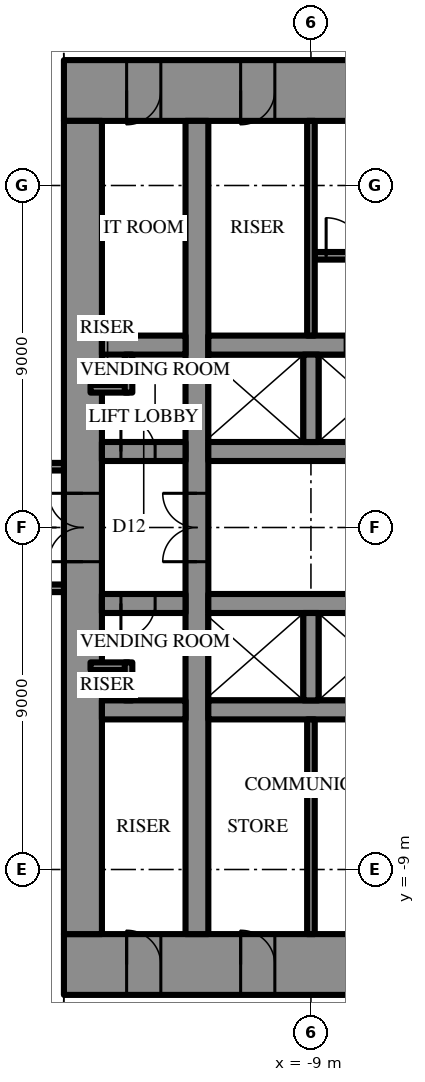
"""IFC4 building model, lengths in metres.
Left out: names, types, materials, properties, quantities, classifications, styles, units other than length and angle.
Written with IfcOpenShell. Run it as: python <this file> out.ifc"""

import sys

from ifc_helpers import new_model, si_unit, direction, frame, frame_2d, origin, place, context, subcontext, project, spatial, rectangle, extrude, element, fill, save


model = new_model("IFC4")
c1 = context("Model", 3, precision=1e-05, world=origin(), true_north=direction((0.0, 1.0)))
c2 = subcontext(c1, "Body", "Model", "MODEL_VIEW")
j1 = project(units=[si_unit("LENGTHUNIT", "METRE"), si_unit("PLANEANGLEUNIT", "RADIAN")], contexts=[c1])
p1 = place(None, origin())
s1 = spatial("IfcSite", under=j1, at=p1, CompositionType="ELEMENT")
p2 = place(p1, origin())
s2 = spatial("IfcBuilding", under=s1, at=p2, CompositionType="ELEMENT")
p3 = place(p2, frame((0.0, 0.0, 223.9)))
s3 = spatial("IfcBuildingStorey", under=s2, at=p3, CompositionType="ELEMENT", Elevation=223.9)
p4 = place(p3, frame((-15.5, 11.5, 0.0), z_axis=(0.0, 0.0, 1.0), x_axis=(1.0, 0.0, 0.0)))
e1 = element("IfcWall", 1, at=p4, inside=s3, PredefinedType="SHEAR", context=c2, shape_type="SweptSolid", body=[
    extrude(rectangle(XDim=31.0, YDim=1.6, at=frame_2d((15.5, 0.0))), origin(), (0.0, 0.0, 1.0), 4.2),
])
p5 = place(p4, frame((16.35, 0.0, 0.0)))
e2 = element("IfcOpeningElement", 2, at=p5, cuts=e1, PredefinedType="OPENING", context=c2, shape_type="SweptSolid", body=[
    extrude(rectangle(XDim=0.9, YDim=2.2, at=frame_2d((0.45, 1.1))), frame((0.0, 0.81, 0.0), z_axis=(0.0, -1.0, 0.0), x_axis=(1.0, 0.0, 0.0)), (0.0, 0.0, 1.0), 1.62),
])
p6 = place(p4, frame((19.35, 0.0, 0.0)))
e3 = element("IfcOpeningElement", 3, at=p6, cuts=e1, PredefinedType="OPENING", context=c2, shape_type="SweptSolid", body=[
    extrude(rectangle(XDim=0.9, YDim=2.2, at=frame_2d((0.45, 1.1))), frame((0.0, 0.81, 0.0), z_axis=(0.0, -1.0, 0.0), x_axis=(1.0, 0.0, 0.0)), (0.0, 0.0, 1.0), 1.62),
])
p7 = place(p4, frame((22.4, 0.0, 0.0)))
e4 = element("IfcOpeningElement", 4, at=p7, cuts=e1, PredefinedType="OPENING", context=c2, shape_type="SweptSolid", body=[
    extrude(rectangle(XDim=1.0, YDim=2.2, at=frame_2d((0.5, 1.1))), frame((0.0, 0.81, 0.0), z_axis=(0.0, -1.0, 0.0), x_axis=(1.0, 0.0, 0.0)), (0.0, 0.0, 1.0), 1.62),
])
p8 = place(p4, frame((1.65, 0.0, 0.0)))
e5 = element("IfcOpeningElement", 5, at=p8, cuts=e1, PredefinedType="OPENING", context=c2, shape_type="SweptSolid", body=[
    extrude(rectangle(XDim=0.9, YDim=2.2, at=frame_2d((0.45, 1.1))), frame((0.0, 0.81, 0.0), z_axis=(0.0, -1.0, 0.0), x_axis=(1.0, 0.0, 0.0)), (0.0, 0.0, 1.0), 1.62),
])
p9 = place(p4, frame((4.65, 0.0, 0.0)))
e6 = element("IfcOpeningElement", 6, at=p9, cuts=e1, PredefinedType="OPENING", context=c2, shape_type="SweptSolid", body=[
    extrude(rectangle(XDim=0.9, YDim=2.2, at=frame_2d((0.45, 1.1))), frame((0.0, 0.81, 0.0), z_axis=(0.0, -1.0, 0.0), x_axis=(1.0, 0.0, 0.0)), (0.0, 0.0, 1.0), 1.62),
])
p10 = place(p4, frame((25.45, 0.0, 0.0)))
e7 = element("IfcOpeningElement", 7, at=p10, cuts=e1, PredefinedType="OPENING", context=c2, shape_type="SweptSolid", body=[
    extrude(rectangle(XDim=0.9, YDim=2.2, at=frame_2d((0.45, 1.1))), frame((0.0, 0.81, 0.0), z_axis=(0.0, -1.0, 0.0), x_axis=(1.0, 0.0, 0.0)), (0.0, 0.0, 1.0), 1.62),
])
p11 = place(p4, frame((28.45, 0.0, 0.0)))
e8 = element("IfcOpeningElement", 8, at=p11, cuts=e1, PredefinedType="OPENING", context=c2, shape_type="SweptSolid", body=[
    extrude(rectangle(XDim=0.9, YDim=2.2, at=frame_2d((0.45, 1.1))), frame((0.0, 0.81, 0.0), z_axis=(0.0, -1.0, 0.0), x_axis=(1.0, 0.0, 0.0)), (0.0, 0.0, 1.0), 1.62),
])
p12 = place(p3, frame((15.5, -11.5, 0.0), z_axis=(0.0, 0.0, 1.0), x_axis=(-1.0, 0.0, 0.0)))
e9 = element("IfcWall", 9, at=p12, inside=s3, PredefinedType="SHEAR", context=c2, shape_type="SweptSolid", body=[
    extrude(rectangle(XDim=31.0, YDim=1.6, at=frame_2d((15.5, 0.0))), origin(), (0.0, 0.0, 1.0), 4.2),
])
p13 = place(p12, frame((16.35, 0.0, 0.0)))
e10 = element("IfcOpeningElement", 10, at=p13, cuts=e9, PredefinedType="OPENING", context=c2, shape_type="SweptSolid", body=[
    extrude(rectangle(XDim=0.9, YDim=2.2, at=frame_2d((0.45, 1.1))), frame((0.0, 0.81, 0.0), z_axis=(0.0, -1.0, 0.0), x_axis=(1.0, 0.0, 0.0)), (0.0, 0.0, 1.0), 1.62),
])
p14 = place(p12, frame((19.35, 0.0, 0.0)))
e11 = element("IfcOpeningElement", 11, at=p14, cuts=e9, PredefinedType="OPENING", context=c2, shape_type="SweptSolid", body=[
    extrude(rectangle(XDim=0.9, YDim=2.2, at=frame_2d((0.45, 1.1))), frame((0.0, 0.81, 0.0), z_axis=(0.0, -1.0, 0.0), x_axis=(1.0, 0.0, 0.0)), (0.0, 0.0, 1.0), 1.62),
])
p15 = place(p12, frame((22.4, 0.0, 0.0)))
e12 = element("IfcOpeningElement", 12, at=p15, cuts=e9, PredefinedType="OPENING", context=c2, shape_type="SweptSolid", body=[
    extrude(rectangle(XDim=1.0, YDim=2.2, at=frame_2d((0.5, 1.1))), frame((0.0, 0.81, 0.0), z_axis=(0.0, -1.0, 0.0), x_axis=(1.0, 0.0, 0.0)), (0.0, 0.0, 1.0), 1.62),
])
p16 = place(p12, frame((1.65, 0.0, 0.0)))
e13 = element("IfcOpeningElement", 13, at=p16, cuts=e9, PredefinedType="OPENING", context=c2, shape_type="SweptSolid", body=[
    extrude(rectangle(XDim=0.9, YDim=2.2, at=frame_2d((0.45, 1.1))), frame((0.0, 0.81, 0.0), z_axis=(0.0, -1.0, 0.0), x_axis=(1.0, 0.0, 0.0)), (0.0, 0.0, 1.0), 1.62),
])
p17 = place(p12, frame((4.65, 0.0, 0.0)))
e14 = element("IfcOpeningElement", 14, at=p17, cuts=e9, PredefinedType="OPENING", context=c2, shape_type="SweptSolid", body=[
    extrude(rectangle(XDim=0.9, YDim=2.2, at=frame_2d((0.45, 1.1))), frame((0.0, 0.81, 0.0), z_axis=(0.0, -1.0, 0.0), x_axis=(1.0, 0.0, 0.0)), (0.0, 0.0, 1.0), 1.62),
])
p18 = place(p12, frame((25.45, 0.0, 0.0)))
e15 = element("IfcOpeningElement", 15, at=p18, cuts=e9, PredefinedType="OPENING", context=c2, shape_type="SweptSolid", body=[
    extrude(rectangle(XDim=0.9, YDim=2.2, at=frame_2d((0.45, 1.1))), frame((0.0, 0.81, 0.0), z_axis=(0.0, -1.0, 0.0), x_axis=(1.0, 0.0, 0.0)), (0.0, 0.0, 1.0), 1.62),
])
p19 = place(p12, frame((28.45, 0.0, 0.0)))
e16 = element("IfcOpeningElement", 16, at=p19, cuts=e9, PredefinedType="OPENING", context=c2, shape_type="SweptSolid", body=[
    extrude(rectangle(XDim=0.9, YDim=2.2, at=frame_2d((0.45, 1.1))), frame((0.0, 0.81, 0.0), z_axis=(0.0, -1.0, 0.0), x_axis=(1.0, 0.0, 0.0)), (0.0, 0.0, 1.0), 1.62),
])
p20 = place(p3, frame((-15.0, 10.7, 0.0), z_axis=(0.0, 0.0, 1.0), x_axis=(0.0, -1.0, 0.0)))
e17 = element("IfcWall", 17, at=p20, inside=s3, PredefinedType="SHEAR", context=c2, shape_type="SweptSolid", body=[
    extrude(rectangle(XDim=21.4, YDim=1.0, at=frame_2d((10.7, 0.0))), origin(), (0.0, 0.0, 1.0), 4.2),
])
p21 = place(p20, frame((9.8, 0.0, 0.0)))
e18 = element("IfcOpeningElement", 18, at=p21, cuts=e17, PredefinedType="OPENING", context=c2, shape_type="SweptSolid", body=[
    extrude(rectangle(XDim=1.8, YDim=2.4, at=frame_2d((0.9, 1.2))), frame((0.0, 0.51, 0.0), z_axis=(0.0, -1.0, 0.0), x_axis=(1.0, 0.0, 0.0)), (0.0, 0.0, 1.0), 1.02),
])
p22 = place(p3, frame((-12.0, -10.7, 0.0), z_axis=(0.0, 0.0, 1.0), x_axis=(0.0, 1.0, 0.0)))
e19 = element("IfcWall", 19, at=p22, inside=s3, PredefinedType="SHEAR", context=c2, shape_type="SweptSolid", body=[
    extrude(rectangle(XDim=21.4, YDim=0.6, at=frame_2d((10.7, 0.0))), origin(), (0.0, 0.0, 1.0), 4.2),
])
p23 = place(p22, frame((9.8, 0.0, 0.0)))
e20 = element("IfcOpeningElement", 20, at=p23, cuts=e19, PredefinedType="OPENING", context=c2, shape_type="SweptSolid", body=[
    extrude(rectangle(XDim=1.8, YDim=2.4, at=frame_2d((0.9, 1.2))), frame((0.0, 0.31, 0.0), z_axis=(0.0, -1.0, 0.0), x_axis=(1.0, 0.0, 0.0)), (0.0, 0.0, 1.0), 0.62),
])
p24 = place(p3, frame((-14.5, 2.0, 0.0), z_axis=(0.0, 0.0, 1.0), x_axis=(1.0, 0.0, 0.0)))
e21 = element("IfcWall", 21, at=p24, inside=s3, PredefinedType="SHEAR", context=c2, shape_type="SweptSolid", body=[
    extrude(rectangle(XDim=2.2, YDim=0.5, at=frame_2d((1.1, 0.0))), origin(), (0.0, 0.0, 1.0), 4.2),
])
p25 = place(p24, frame((0.5, 0.0, 0.0)))
e22 = element("IfcOpeningElement", 22, at=p25, cuts=e21, PredefinedType="OPENING", context=c2, shape_type="SweptSolid", body=[
    extrude(rectangle(XDim=0.9, YDim=2.2, at=frame_2d((0.45, 1.1))), frame((0.0, 0.26, 0.0), z_axis=(0.0, -1.0, 0.0), x_axis=(1.0, 0.0, 0.0)), (0.0, 0.0, 1.0), 0.52),
])
p26 = place(p3, frame((-11.7, 2.0, 0.0), z_axis=(0.0, 0.0, 1.0), x_axis=(1.0, 0.0, 0.0)))
e23 = element("IfcWall", 23, at=p26, inside=s3, PredefinedType="SHEAR", context=c2, shape_type="SweptSolid", body=[
    extrude(rectangle(XDim=5.9, YDim=0.5, at=frame_2d((2.95, 0.0))), origin(), (0.0, 0.0, 1.0), 4.2),
])
p27 = place(p3, frame((-14.5, 4.8, 0.0), z_axis=(0.0, 0.0, 1.0), x_axis=(1.0, 0.0, 0.0)))
e24 = element("IfcWall", 24, at=p27, inside=s3, PredefinedType="SHEAR", context=c2, shape_type="SweptSolid", body=[
    extrude(rectangle(XDim=2.2, YDim=0.5, at=frame_2d((1.1, 0.0))), origin(), (0.0, 0.0, 1.0), 4.2),
])
p28 = place(p3, frame((-11.7, 4.8, 0.0), z_axis=(0.0, 0.0, 1.0), x_axis=(1.0, 0.0, 0.0)))
e25 = element("IfcWall", 25, at=p28, inside=s3, PredefinedType="SHEAR", context=c2, shape_type="SweptSolid", body=[
    extrude(rectangle(XDim=23.4, YDim=0.5, at=frame_2d((11.7, 0.0))), origin(), (0.0, 0.0, 1.0), 4.2),
])
p29 = place(p28, frame((6.6, 0.0, 0.0)))
e26 = element("IfcOpeningElement", 26, at=p29, cuts=e25, PredefinedType="OPENING", context=c2, shape_type="SweptSolid", body=[
    extrude(rectangle(XDim=1.2, YDim=2.2, at=frame_2d((0.6, 1.1))), frame((0.0, 0.26, 0.0), z_axis=(0.0, -1.0, 0.0), x_axis=(1.0, 0.0, 0.0)), (0.0, 0.0, 1.0), 0.52),
])
p30 = place(p28, frame((3.6, 0.0, 0.0)))
e27 = element("IfcOpeningElement", 27, at=p30, cuts=e25, PredefinedType="OPENING", context=c2, shape_type="SweptSolid", body=[
    extrude(rectangle(XDim=1.2, YDim=2.2, at=frame_2d((0.6, 1.1))), frame((0.0, 0.26, 0.0), z_axis=(0.0, -1.0, 0.0), x_axis=(1.0, 0.0, 0.0)), (0.0, 0.0, 1.0), 0.52),
])
p31 = place(p3, frame((-9.0, 2.25, 0.0), z_axis=(0.0, 0.0, 1.0), x_axis=(0.0, 1.0, 0.0)))
e28 = element("IfcWall", 28, at=p31, inside=s3, PredefinedType="SHEAR", context=c2, shape_type="SweptSolid", body=[
    extrude(rectangle(XDim=2.3, YDim=0.4, at=frame_2d((1.15, 0.0))), origin(), (0.0, 0.0, 1.0), 4.2),
])
p32 = place(p3, frame((-8.9, 7.15, 0.0), z_axis=(0.0, 0.0, 1.0), x_axis=(1.0, 0.0, 0.0)))
e29 = element("IfcWall", 29, at=p32, inside=s3, PredefinedType="SHEAR", context=c2, shape_type="SweptSolid", body=[
    extrude(rectangle(XDim=8.6, YDim=0.2, at=frame_2d((4.3, 0.0))), origin(), (0.0, 0.0, 1.0), 4.2),
])
p33 = place(p32, frame((0.3, 0.0, 0.0)))
e30 = element("IfcOpeningElement", 30, at=p33, cuts=e29, PredefinedType="OPENING", context=c2, shape_type="SweptSolid", body=[
    extrude(rectangle(XDim=1.0, YDim=2.2, at=frame_2d((0.5, 1.1))), frame((0.0, 0.11, 0.0), z_axis=(0.0, -1.0, 0.0), x_axis=(1.0, 0.0, 0.0)), (0.0, 0.0, 1.0), 0.22),
])
p34 = place(p3, frame((3.2, -2.0, 0.0), z_axis=(0.0, 0.0, 1.0), x_axis=(-1.0, 0.0, 0.0)))
e31 = element("IfcWall", 31, at=p34, inside=s3, PredefinedType="SHEAR", context=c2, shape_type="SweptSolid", body=[
    extrude(rectangle(XDim=14.9, YDim=0.5, at=frame_2d((7.45, 0.0))), origin(), (0.0, 0.0, 1.0), 4.2),
])
p35 = place(p34, frame((1.15, 0.0, 0.0)))
e32 = element("IfcOpeningElement", 32, at=p35, cuts=e31, PredefinedType="OPENING", context=c2, shape_type="SweptSolid", body=[
    extrude(rectangle(XDim=1.1, YDim=2.2, at=frame_2d((0.55, 1.1))), frame((0.0, 0.26, 0.0), z_axis=(0.0, -1.0, 0.0), x_axis=(1.0, 0.0, 0.0)), (0.0, 0.0, 1.0), 0.52),
])
p36 = place(p34, frame((4.15, 0.0, 0.0)))
e33 = element("IfcOpeningElement", 33, at=p36, cuts=e31, PredefinedType="OPENING", context=c2, shape_type="SweptSolid", body=[
    extrude(rectangle(XDim=1.1, YDim=2.2, at=frame_2d((0.55, 1.1))), frame((0.0, 0.26, 0.0), z_axis=(0.0, -1.0, 0.0), x_axis=(1.0, 0.0, 0.0)), (0.0, 0.0, 1.0), 0.52),
])
p37 = place(p34, frame((7.15, 0.0, 0.0)))
e34 = element("IfcOpeningElement", 34, at=p37, cuts=e31, PredefinedType="OPENING", context=c2, shape_type="SweptSolid", body=[
    extrude(rectangle(XDim=1.1, YDim=2.2, at=frame_2d((0.55, 1.1))), frame((0.0, 0.26, 0.0), z_axis=(0.0, -1.0, 0.0), x_axis=(1.0, 0.0, 0.0)), (0.0, 0.0, 1.0), 0.52),
])
p38 = place(p34, frame((10.15, 0.0, 0.0)))
e35 = element("IfcOpeningElement", 35, at=p38, cuts=e31, PredefinedType="OPENING", context=c2, shape_type="SweptSolid", body=[
    extrude(rectangle(XDim=1.1, YDim=2.2, at=frame_2d((0.55, 1.1))), frame((0.0, 0.26, 0.0), z_axis=(0.0, -1.0, 0.0), x_axis=(1.0, 0.0, 0.0)), (0.0, 0.0, 1.0), 0.52),
])
p39 = place(p3, frame((-12.3, -2.0, 0.0), z_axis=(0.0, 0.0, 1.0), x_axis=(-1.0, 0.0, 0.0)))
e36 = element("IfcWall", 36, at=p39, inside=s3, PredefinedType="SHEAR", context=c2, shape_type="SweptSolid", body=[
    extrude(rectangle(XDim=2.2, YDim=0.5, at=frame_2d((1.1, 0.0))), origin(), (0.0, 0.0, 1.0), 4.2),
])
p40 = place(p39, frame((0.8, 0.0, 0.0)))
e37 = element("IfcOpeningElement", 37, at=p40, cuts=e36, PredefinedType="OPENING", context=c2, shape_type="SweptSolid", body=[
    extrude(rectangle(XDim=0.9, YDim=2.2, at=frame_2d((0.45, 1.1))), frame((0.0, 0.26, 0.0), z_axis=(0.0, -1.0, 0.0), x_axis=(1.0, 0.0, 0.0)), (0.0, 0.0, 1.0), 0.52),
])
p41 = place(p3, frame((11.7, -4.8, 0.0), z_axis=(0.0, 0.0, 1.0), x_axis=(-1.0, 0.0, 0.0)))
e38 = element("IfcWall", 38, at=p41, inside=s3, PredefinedType="SHEAR", context=c2, shape_type="SweptSolid", body=[
    extrude(rectangle(XDim=23.4, YDim=0.5, at=frame_2d((11.7, 0.0))), origin(), (0.0, 0.0, 1.0), 4.2),
])
p42 = place(p41, frame((6.6, 0.0, 0.0)))
e39 = element("IfcOpeningElement", 39, at=p42, cuts=e38, PredefinedType="OPENING", context=c2, shape_type="SweptSolid", body=[
    extrude(rectangle(XDim=1.2, YDim=2.2, at=frame_2d((0.6, 1.1))), frame((0.0, 0.26, 0.0), z_axis=(0.0, -1.0, 0.0), x_axis=(1.0, 0.0, 0.0)), (0.0, 0.0, 1.0), 0.52),
])
p43 = place(p41, frame((3.6, 0.0, 0.0)))
e40 = element("IfcOpeningElement", 40, at=p43, cuts=e38, PredefinedType="OPENING", context=c2, shape_type="SweptSolid", body=[
    extrude(rectangle(XDim=1.2, YDim=2.2, at=frame_2d((0.6, 1.1))), frame((0.0, 0.26, 0.0), z_axis=(0.0, -1.0, 0.0), x_axis=(1.0, 0.0, 0.0)), (0.0, 0.0, 1.0), 0.52),
])
p44 = place(p3, frame((-12.3, -4.8, 0.0), z_axis=(0.0, 0.0, 1.0), x_axis=(-1.0, 0.0, 0.0)))
e41 = element("IfcWall", 41, at=p44, inside=s3, PredefinedType="SHEAR", context=c2, shape_type="SweptSolid", body=[
    extrude(rectangle(XDim=2.2, YDim=0.5, at=frame_2d((1.1, 0.0))), origin(), (0.0, 0.0, 1.0), 4.2),
])
p45 = place(p3, frame((-9.0, -2.25, 0.0), z_axis=(0.0, 0.0, 1.0), x_axis=(0.0, -1.0, 0.0)))
e42 = element("IfcWall", 42, at=p45, inside=s3, PredefinedType="SHEAR", context=c2, shape_type="SweptSolid", body=[
    extrude(rectangle(XDim=2.3, YDim=0.4, at=frame_2d((1.15, 0.0))), origin(), (0.0, 0.0, 1.0), 4.2),
])
for number, where, z_axis, x_axis in (
    (43, (-9.0, 5.05, 0.0), (0.0, 0.0, 1.0), (0.0, 1.0, 0.0)),
    (44, (-9.0, -5.05, 0.0), (0.0, 0.0, 1.0), (0.0, -1.0, 0.0)),
):
    element("IfcWall", number, at=place(p3, frame(where, z_axis=z_axis, x_axis=x_axis)), inside=s3, PredefinedType="PARTITIONING", context=c2, shape_type="SweptSolid", body=[
        extrude(rectangle(XDim=5.65, YDim=0.2, at=frame_2d((2.825, 0.0))), origin(), (0.0, 0.0, 1.0), 4.0),
    ])
for number, where, z_axis, x_axis in (
    (45, (-14.8, 3.65, 0.0), (0.0, 0.0, 1.0), (1.0, 0.0, 0.0)),
    (46, (-13.8, 3.55, 0.0), (0.0, 0.0, 1.0), (0.0, 1.0, 0.0)),
    (47, (-13.8, -3.65, 0.0), (0.0, 0.0, 1.0), (-1.0, 0.0, 0.0)),
    (48, (-13.8, -3.55, 0.0), (0.0, 0.0, 1.0), (0.0, -1.0, 0.0)),
):
    element("IfcWall", number, at=place(p3, frame(where, z_axis=z_axis, x_axis=x_axis)), inside=s3, PredefinedType="PARTITIONING", context=c2, shape_type="SweptSolid", body=[
        extrude(rectangle(XDim=1.0, YDim=0.2, at=frame_2d((0.5, 0.0))), origin(), (0.0, 0.0, 1.0), 4.0),
    ])
p46 = place(p3, frame((-15.5, 1.6, 0.0), z_axis=(0.0, 0.0, 1.0), x_axis=(-1.0, 0.0, 0.0)))
e49 = element("IfcWall", 49, at=p46, inside=s3, PredefinedType="PARTITIONING", context=c2, shape_type="SweptSolid", body=[
    extrude(rectangle(XDim=12.2, YDim=0.2, at=frame_2d((6.1, 0.0))), origin(), (0.0, 0.0, 1.0), 4.0),
])
p47 = place(p46, frame((3.16, 0.0, 0.0)))
e50 = element("IfcOpeningElement", 50, at=p47, cuts=e49, PredefinedType="OPENING", context=c2, shape_type="SweptSolid", body=[
    extrude(rectangle(XDim=1.0, YDim=2.2, at=frame_2d((0.5, 1.1))), frame((0.0, 0.11, 0.0), z_axis=(0.0, -1.0, 0.0), x_axis=(1.0, 0.0, 0.0)), (0.0, 0.0, 1.0), 0.22),
])
p48 = place(p3, frame((-15.5, -1.6, 0.0), z_axis=(0.0, 0.0, 1.0), x_axis=(-1.0, 0.0, 0.0)))
e51 = element("IfcWall", 51, at=p48, inside=s3, PredefinedType="PARTITIONING", context=c2, shape_type="SweptSolid", body=[
    extrude(rectangle(XDim=12.2, YDim=0.2, at=frame_2d((6.1, 0.0))), origin(), (0.0, 0.0, 1.0), 4.0),
])
p49 = place(p48, frame((3.16, 0.0, 0.0)))
e52 = element("IfcOpeningElement", 52, at=p49, cuts=e51, PredefinedType="OPENING", context=c2, shape_type="SweptSolid", body=[
    extrude(rectangle(XDim=1.0, YDim=2.2, at=frame_2d((0.5, 1.1))), frame((0.0, 0.11, 0.0), z_axis=(0.0, -1.0, 0.0), x_axis=(1.0, 0.0, 0.0)), (0.0, 0.0, 1.0), 0.22),
])
p50 = place(p21, frame((1.8, 0.0, 0.0), z_axis=(0.0, 0.0, 1.0), x_axis=(-1.0, 0.0, 0.0)))
e53 = element("IfcDoor", 53, at=p50, inside=s3, OperationType="DOUBLE_DOOR_SINGLE_SWING", PredefinedType="DOOR", context=c2, shape_type="SweptSolid", body=[
    extrude(rectangle(XDim=1.8, YDim=2.4, at=frame_2d((0.9, 1.2))), frame((0.0, 0.025, 0.0), z_axis=(0.0, -1.0, 0.0), x_axis=(1.0, 0.0, 0.0)), (0.0, 0.0, 1.0), 0.05),
])
fill(e18, e53)
p51 = place(p33, origin())
e54 = element("IfcDoor", 54, at=p51, inside=s3, OperationType="SINGLE_SWING_RIGHT", PredefinedType="DOOR", context=c2, shape_type="SweptSolid", body=[
    extrude(rectangle(XDim=1.0, YDim=2.2, at=frame_2d((0.5, 1.1))), frame((0.0, 0.025, 0.0), z_axis=(0.0, -1.0, 0.0), x_axis=(1.0, 0.0, 0.0)), (0.0, 0.0, 1.0), 0.05),
])
fill(e30, e54)
p52 = place(p8, frame((0.9, 0.0, 0.0), z_axis=(0.0, 0.0, 1.0), x_axis=(-1.0, 0.0, 0.0)))
e55 = element("IfcDoor", 55, at=p52, inside=s3, OperationType="SINGLE_SWING_LEFT", PredefinedType="DOOR", context=c2, shape_type="SweptSolid", body=[
    extrude(rectangle(XDim=0.9, YDim=2.2, at=frame_2d((0.45, 1.1))), frame((0.0, 0.025, 0.0), z_axis=(0.0, -1.0, 0.0), x_axis=(1.0, 0.0, 0.0)), (0.0, 0.0, 1.0), 0.05),
])
fill(e5, e55)
p53 = place(p9, frame((0.9, 0.0, 0.0), z_axis=(0.0, 0.0, 1.0), x_axis=(-1.0, 0.0, 0.0)))
e56 = element("IfcDoor", 56, at=p53, inside=s3, OperationType="SINGLE_SWING_LEFT", PredefinedType="DOOR", context=c2, shape_type="SweptSolid", body=[
    extrude(rectangle(XDim=0.9, YDim=2.2, at=frame_2d((0.45, 1.1))), frame((0.0, 0.025, 0.0), z_axis=(0.0, -1.0, 0.0), x_axis=(1.0, 0.0, 0.0)), (0.0, 0.0, 1.0), 0.05),
])
fill(e6, e56)
p54 = place(p18, frame((0.9, 0.0, 0.0), z_axis=(0.0, 0.0, 1.0), x_axis=(-1.0, 0.0, 0.0)))
e57 = element("IfcDoor", 57, at=p54, inside=s3, OperationType="SINGLE_SWING_RIGHT", PredefinedType="DOOR", context=c2, shape_type="SweptSolid", body=[
    extrude(rectangle(XDim=0.9, YDim=2.2, at=frame_2d((0.45, 1.1))), frame((0.0, 0.025, 0.0), z_axis=(0.0, -1.0, 0.0), x_axis=(1.0, 0.0, 0.0)), (0.0, 0.0, 1.0), 0.05),
])
fill(e15, e57)
p55 = place(p19, frame((0.9, 0.0, 0.0), z_axis=(0.0, 0.0, 1.0), x_axis=(-1.0, 0.0, 0.0)))
e58 = element("IfcDoor", 58, at=p55, inside=s3, OperationType="SINGLE_SWING_RIGHT", PredefinedType="DOOR", context=c2, shape_type="SweptSolid", body=[
    extrude(rectangle(XDim=0.9, YDim=2.2, at=frame_2d((0.45, 1.1))), frame((0.0, 0.025, 0.0), z_axis=(0.0, -1.0, 0.0), x_axis=(1.0, 0.0, 0.0)), (0.0, 0.0, 1.0), 0.05),
])
fill(e16, e58)
p56 = place(p25, origin())
e59 = element("IfcDoor", 59, at=p56, inside=s3, OperationType="SINGLE_SWING_RIGHT", PredefinedType="DOOR", context=c2, shape_type="SweptSolid", body=[
    extrude(rectangle(XDim=0.9, YDim=2.2, at=frame_2d((0.45, 1.1))), frame((0.0, 0.025, 0.0), z_axis=(0.0, -1.0, 0.0), x_axis=(1.0, 0.0, 0.0)), (0.0, 0.0, 1.0), 0.05),
])
fill(e22, e59)
p57 = place(p40, origin())
e60 = element("IfcDoor", 60, at=p57, inside=s3, OperationType="SINGLE_SWING_LEFT", PredefinedType="DOOR", context=c2, shape_type="SweptSolid", body=[
    extrude(rectangle(XDim=0.9, YDim=2.2, at=frame_2d((0.45, 1.1))), frame((0.0, 0.025, 0.0), z_axis=(0.0, -1.0, 0.0), x_axis=(1.0, 0.0, 0.0)), (0.0, 0.0, 1.0), 0.05),
])
fill(e37, e60)
p58 = place(p23, origin())
e61 = element("IfcDoor", 61, at=p58, inside=s3, OperationType="DOUBLE_DOOR_SINGLE_SWING", PredefinedType="DOOR", context=c2, shape_type="SweptSolid", body=[
    extrude(rectangle(XDim=1.8, YDim=2.4, at=frame_2d((0.9, 1.2))), frame((0.0, 0.025, 0.0), z_axis=(0.0, -1.0, 0.0), x_axis=(1.0, 0.0, 0.0)), (0.0, 0.0, 1.0), 0.05),
])
fill(e20, e61)
save(model, sys.argv[1])
